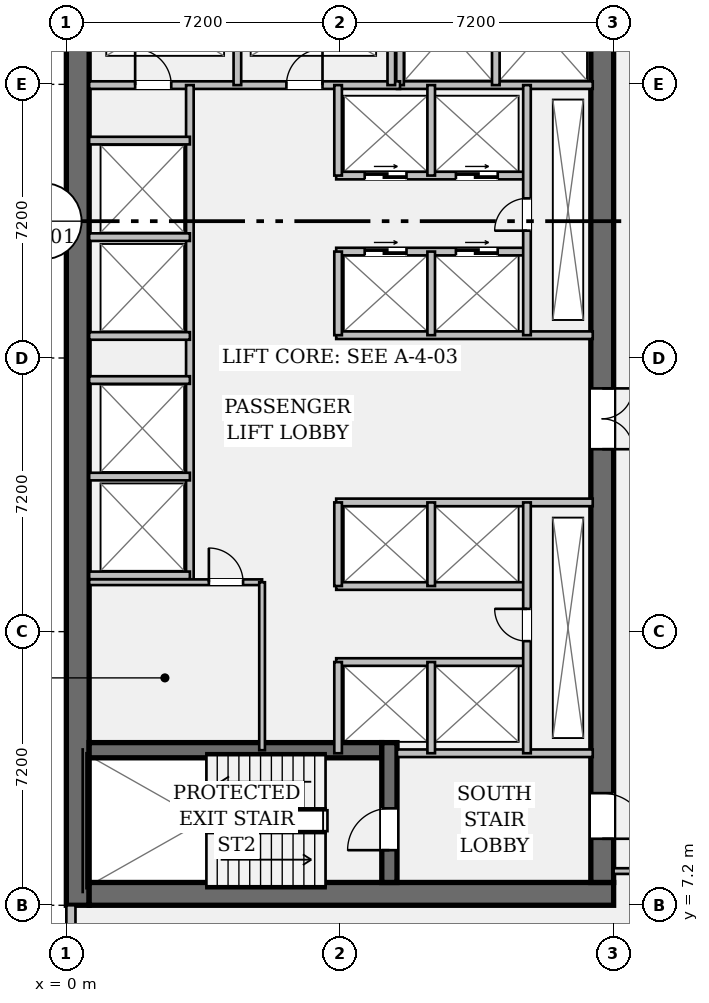
"""IFC4 building model, lengths in metres.
Left out: names, types, materials, properties, quantities, classifications, styles, units other than length and angle.
Written with IfcOpenShell. Run it as: python <this file> out.ifc"""

import sys

from ifc_helpers import new_model, si_unit, direction, frame, frame_2d, origin, place, context, subcontext, project, spatial, rectangle, extrude, element, fill, save


model = new_model("IFC4")
c1 = context("Model", 3, precision=1e-05, world=origin(), true_north=direction((0.0, 1.0)))
c2 = subcontext(c1, "Body", "Model", "MODEL_VIEW")
j1 = project(units=[si_unit("LENGTHUNIT", "METRE"), si_unit("PLANEANGLEUNIT", "RADIAN")], contexts=[c1])
p1 = place(None, origin())
s1 = spatial("IfcSite", under=j1, at=p1, CompositionType="ELEMENT")
p2 = place(p1, origin())
s2 = spatial("IfcBuilding", under=s1, at=p2, CompositionType="ELEMENT")
p3 = place(p2, frame((0.0, 0.0, 17.85)))
s3 = spatial("IfcBuildingStorey", under=s2, at=p3, CompositionType="ELEMENT", Elevation=17.85)
p4 = place(p3, frame((0.3, 7.2, 0.0), z_axis=(0.0, 0.0, 1.0), x_axis=(0.0, 1.0, 0.0)))
e1 = element("IfcWall", 1, at=p4, inside=s3, PredefinedType="SHEAR", context=c2, shape_type="SweptSolid", body=[
    extrude(rectangle(XDim=28.8, YDim=0.6, at=frame_2d((14.4, 0.0))), origin(), (0.0, 0.0, 1.0), 3.91),
])
p5 = place(p3, frame((0.6, 7.5, 0.0), z_axis=(0.0, 0.0, 1.0), x_axis=(1.0, 0.0, 0.0)))
e2 = element("IfcWall", 2, at=p5, inside=s3, PredefinedType="SHEAR", context=c2, shape_type="SweptSolid", body=[
    extrude(rectangle(XDim=13.8, YDim=0.6, at=frame_2d((6.9, 0.0))), origin(), (0.0, 0.0, 1.0), 3.91),
])
p6 = place(p3, frame((14.1, 35.4, 0.0), z_axis=(0.0, 0.0, 1.0), x_axis=(0.0, -1.0, 0.0)))
e3 = element("IfcWall", 3, at=p6, inside=s3, PredefinedType="SHEAR", context=c2, shape_type="SweptSolid", body=[
    extrude(rectangle(XDim=27.6, YDim=0.6, at=frame_2d((13.8, 0.0))), origin(), (0.0, 0.0, 1.0), 3.91),
])
p7 = place(p6, frame((1.3, 0.0, 0.0)))
e4 = element("IfcOpeningElement", 4, at=p7, cuts=e3, PredefinedType="OPENING", context=c2, shape_type="SweptSolid", body=[
    extrude(rectangle(XDim=1.2, YDim=2.15, at=frame_2d((0.6, 1.075))), frame((0.0, 0.312, 0.0), z_axis=(0.0, -1.0, 0.0), x_axis=(1.0, 0.0, 0.0)), (0.0, 0.0, 1.0), 0.624),
])
p8 = place(p6, frame((25.25, 0.0, 0.0)))
e5 = element("IfcOpeningElement", 5, at=p8, cuts=e3, PredefinedType="OPENING", context=c2, shape_type="SweptSolid", body=[
    extrude(rectangle(XDim=1.2, YDim=2.15, at=frame_2d((0.6, 1.075))), frame((0.0, 0.312, 0.0), z_axis=(0.0, -1.0, 0.0), x_axis=(1.0, 0.0, 0.0)), (0.0, 0.0, 1.0), 0.624),
])
p9 = place(p6, frame((14.6, 0.0, 0.0)))
e6 = element("IfcOpeningElement", 6, at=p9, cuts=e3, PredefinedType="OPENING", context=c2, shape_type="SweptSolid", body=[
    extrude(rectangle(XDim=1.6, YDim=2.2, at=frame_2d((0.8, 1.1))), frame((0.0, 0.312, 0.0), z_axis=(0.0, -1.0, 0.0), x_axis=(1.0, 0.0, 0.0)), (0.0, 0.0, 1.0), 0.624),
])
p10 = place(p3, frame((0.6, 11.28, 0.0), z_axis=(0.0, 0.0, 1.0), x_axis=(1.0, 0.0, 0.0)))
e7 = element("IfcWall", 7, at=p10, inside=s3, PredefinedType="SHEAR", context=c2, shape_type="SweptSolid", body=[
    extrude(rectangle(XDim=7.7, YDim=0.4, at=frame_2d((3.85, 0.0))), origin(), (0.0, 0.0, 1.0), 3.91),
])
p11 = place(p3, frame((8.5, 7.8, 0.0), z_axis=(0.0, 0.0, 1.0), x_axis=(0.0, 1.0, 0.0)))
e8 = element("IfcWall", 8, at=p11, inside=s3, PredefinedType="SHEAR", context=c2, shape_type="SweptSolid", body=[
    extrude(rectangle(XDim=3.68, YDim=0.4, at=frame_2d((1.84, 0.0))), origin(), (0.0, 0.0, 1.0), 3.91),
])
p12 = place(p11, frame((0.85, 0.0, 0.0)))
e9 = element("IfcOpeningElement", 9, at=p12, cuts=e8, PredefinedType="OPENING", context=c2, shape_type="SweptSolid", body=[
    extrude(rectangle(XDim=1.1, YDim=2.15, at=frame_2d((0.55, 1.075))), frame((0.0, 0.212, 0.0), z_axis=(0.0, -1.0, 0.0), x_axis=(1.0, 0.0, 0.0)), (0.0, 0.0, 1.0), 0.424),
])
p13 = place(p3, frame((0.12, 2.82, 0.0), z_axis=(0.0, 0.0, 1.0), x_axis=(0.0, 1.0, 0.0)))
e10 = element("IfcWall", 10, at=p13, inside=s3, PredefinedType="STANDARD", context=c2, shape_type="SweptSolid", body=[
    extrude(rectangle(XDim=4.38, YDim=0.24, at=frame_2d((2.19, 0.0))), origin(), (0.0, 0.0, 1.0), 3.91),
])
p14 = place(p13, frame((1.29, 0.0, 0.95)))
e11 = element("IfcOpeningElement", 11, at=p14, cuts=e10, PredefinedType="OPENING", context=c2, shape_type="SweptSolid", body=[
    extrude(rectangle(XDim=1.8, YDim=1.8, at=frame_2d((0.9, 0.9))), frame((0.0, 0.132, 0.0), z_axis=(0.0, -1.0, 0.0), x_axis=(1.0, 0.0, 0.0)), (0.0, 0.0, 1.0), 0.264),
])
for number, where, z_axis, x_axis in (
    (12, (8.7, 11.2, 0.0), (0.0, 0.0, 1.0), (1.0, 0.0, 0.0)),
    (13, (8.7, 28.78, 0.0), (0.0, 0.0, 1.0), (1.0, 0.0, 0.0)),
):
    element("IfcWall", number, at=place(p3, frame(where, z_axis=z_axis, x_axis=x_axis)), inside=s3, PredefinedType="PARTITIONING", context=c2, shape_type="SweptSolid", body=[
        extrude(rectangle(XDim=5.15, YDim=0.2, at=frame_2d((2.575, 0.0))), origin(), (0.0, 0.0, 1.0), 3.91),
    ])
for number, where, z_axis, x_axis in (
    (14, (8.78, 28.78, 0.0), (0.0, 0.0, 1.0), (0.0, 1.0, 0.0)),
    (15, (11.3, 28.78, 0.0), (0.0, 0.0, 1.0), (0.0, 1.0, 0.0)),
):
    element("IfcWall", number, at=place(p3, frame(where, z_axis=z_axis, x_axis=x_axis)), inside=s3, PredefinedType="PARTITIONING", context=c2, shape_type="SweptSolid", body=[
        extrude(rectangle(XDim=3.1, YDim=0.2, at=frame_2d((1.55, 0.0))), origin(), (0.0, 0.0, 1.0), 3.91),
    ])
p15 = place(p3, frame((0.6, 28.78, 0.0), z_axis=(0.0, 0.0, 1.0), x_axis=(1.0, 0.0, 0.0)))
e16 = element("IfcWall", 16, at=p15, inside=s3, PredefinedType="PARTITIONING", context=c2, shape_type="SweptSolid", body=[
    extrude(rectangle(XDim=8.18, YDim=0.2, at=frame_2d((4.09, 0.0))), origin(), (0.0, 0.0, 1.0), 3.91),
])
p16 = place(p15, frame((1.21, 0.0, 0.0)))
e17 = element("IfcOpeningElement", 17, at=p16, cuts=e16, PredefinedType="OPENING", context=c2, shape_type="SweptSolid", body=[
    extrude(rectangle(XDim=0.95, YDim=2.15, at=frame_2d((0.475, 1.075))), frame((0.0, 0.112, 0.0), z_axis=(0.0, -1.0, 0.0), x_axis=(1.0, 0.0, 0.0)), (0.0, 0.0, 1.0), 0.224),
])
p17 = place(p15, frame((5.19, 0.0, 0.0)))
e18 = element("IfcOpeningElement", 18, at=p17, cuts=e16, PredefinedType="OPENING", context=c2, shape_type="SweptSolid", body=[
    extrude(rectangle(XDim=0.95, YDim=2.15, at=frame_2d((0.475, 1.075))), frame((0.0, 0.112, 0.0), z_axis=(0.0, -1.0, 0.0), x_axis=(1.0, 0.0, 0.0)), (0.0, 0.0, 1.0), 0.224),
])
for number, where, z_axis, x_axis in (
    (19, (4.5, 28.78, 0.0), (0.0, 0.0, 1.0), (0.0, 1.0, 0.0)),
    (20, (8.55, 28.78, 0.0), (0.0, 0.0, 1.0), (0.0, 1.0, 0.0)),
):
    element("IfcWall", number, at=place(p3, frame(where, z_axis=z_axis, x_axis=x_axis)), inside=s3, PredefinedType="PARTITIONING", context=c2, shape_type="SweptSolid", body=[
        extrude(rectangle(XDim=2.94, YDim=0.2, at=frame_2d((1.47, 0.0))), origin(), (0.0, 0.0, 1.0), 3.91),
    ])
p18 = place(p3, frame((3.25, 15.7, 0.0), z_axis=(0.0, 0.0, 1.0), x_axis=(0.0, 1.0, 0.0)))
e21 = element("IfcWall", 21, at=p18, inside=s3, PredefinedType="PARTITIONING", context=c2, shape_type="SweptSolid", body=[
    extrude(rectangle(XDim=13.08, YDim=0.2, at=frame_2d((6.54, 0.0))), origin(), (0.0, 0.0, 1.0), 3.91),
])
for number, where, z_axis, x_axis in (
    (22, (0.6, 15.88, 0.0), (0.0, 0.0, 1.0), (1.0, 0.0, 0.0)),
    (23, (0.6, 18.48, 0.0), (0.0, 0.0, 1.0), (1.0, 0.0, 0.0)),
    (24, (0.6, 22.18, 0.0), (0.0, 0.0, 1.0), (1.0, 0.0, 0.0)),
    (25, (0.6, 24.78, 0.0), (0.0, 0.0, 1.0), (1.0, 0.0, 0.0)),
    (26, (0.6, 21.02, 0.0), (0.0, 0.0, 1.0), (1.0, 0.0, 0.0)),
    (27, (0.6, 27.32, 0.0), (0.0, 0.0, 1.0), (1.0, 0.0, 0.0)),
):
    element("IfcWall", number, at=place(p3, frame(where, z_axis=z_axis, x_axis=x_axis)), inside=s3, PredefinedType="PARTITIONING", context=c2, shape_type="SweptSolid", body=[
        extrude(rectangle(XDim=2.65, YDim=0.2, at=frame_2d((1.325, 0.0))), origin(), (0.0, 0.0, 1.0), 3.91),
    ])
p19 = place(p3, frame((7.1, 22.2, 0.0), z_axis=(0.0, 0.0, 1.0), x_axis=(1.0, 0.0, 0.0)))
e28 = element("IfcWall", 28, at=p19, inside=s3, PredefinedType="PARTITIONING", context=c2, shape_type="SweptSolid", body=[
    extrude(rectangle(XDim=6.75, YDim=0.2, at=frame_2d((3.375, 0.0))), origin(), (0.0, 0.0, 1.0), 3.91),
])
p20 = place(p3, frame((7.1, 24.4, 0.0), z_axis=(0.0, 0.0, 1.0), x_axis=(1.0, 0.0, 0.0)))
e29 = element("IfcWall", 29, at=p20, inside=s3, PredefinedType="PARTITIONING", context=c2, shape_type="SweptSolid", body=[
    extrude(rectangle(XDim=5.02, YDim=0.2, at=frame_2d((2.51, 0.0))), origin(), (0.0, 0.0, 1.0), 3.91),
])
p21 = place(p20, frame((0.75, 0.0, 0.0)))
e30 = element("IfcOpeningElement", 30, at=p21, cuts=e29, PredefinedType="OPENING", context=c2, shape_type="SweptSolid", body=[
    extrude(rectangle(XDim=1.1, YDim=2.2, at=frame_2d((0.55, 1.1))), frame((0.0, 0.112, 0.0), z_axis=(0.0, -1.0, 0.0), x_axis=(1.0, 0.0, 0.0)), (0.0, 0.0, 1.0), 0.224),
])
p22 = place(p20, frame((3.15, 0.0, 0.0)))
e31 = element("IfcOpeningElement", 31, at=p22, cuts=e29, PredefinedType="OPENING", context=c2, shape_type="SweptSolid", body=[
    extrude(rectangle(XDim=1.1, YDim=2.2, at=frame_2d((0.55, 1.1))), frame((0.0, 0.112, 0.0), z_axis=(0.0, -1.0, 0.0), x_axis=(1.0, 0.0, 0.0)), (0.0, 0.0, 1.0), 0.224),
])
p23 = place(p3, frame((7.1, 26.4, 0.0), z_axis=(0.0, 0.0, 1.0), x_axis=(1.0, 0.0, 0.0)))
e32 = element("IfcWall", 32, at=p23, inside=s3, PredefinedType="PARTITIONING", context=c2, shape_type="SweptSolid", body=[
    extrude(rectangle(XDim=5.02, YDim=0.2, at=frame_2d((2.51, 0.0))), origin(), (0.0, 0.0, 1.0), 3.91),
])
p24 = place(p23, frame((0.75, 0.0, 0.0)))
e33 = element("IfcOpeningElement", 33, at=p24, cuts=e32, PredefinedType="OPENING", context=c2, shape_type="SweptSolid", body=[
    extrude(rectangle(XDim=1.1, YDim=2.2, at=frame_2d((0.55, 1.1))), frame((0.0, 0.112, 0.0), z_axis=(0.0, -1.0, 0.0), x_axis=(1.0, 0.0, 0.0)), (0.0, 0.0, 1.0), 0.224),
])
p25 = place(p23, frame((3.15, 0.0, 0.0)))
e34 = element("IfcOpeningElement", 34, at=p25, cuts=e32, PredefinedType="OPENING", context=c2, shape_type="SweptSolid", body=[
    extrude(rectangle(XDim=1.1, YDim=2.2, at=frame_2d((0.55, 1.1))), frame((0.0, 0.112, 0.0), z_axis=(0.0, -1.0, 0.0), x_axis=(1.0, 0.0, 0.0)), (0.0, 0.0, 1.0), 0.224),
])
p26 = place(p3, frame((7.15, 22.2, 0.0), z_axis=(0.0, 0.0, 1.0), x_axis=(0.0, 1.0, 0.0)))
e35 = element("IfcWall", 35, at=p26, inside=s3, PredefinedType="PARTITIONING", context=c2, shape_type="SweptSolid", body=[
    extrude(rectangle(XDim=2.2, YDim=0.2, at=frame_2d((1.1, 0.0))), origin(), (0.0, 0.0, 1.0), 3.91),
])
p27 = place(p3, frame((7.15, 26.4, 0.0), z_axis=(0.0, 0.0, 1.0), x_axis=(0.0, 1.0, 0.0)))
e36 = element("IfcWall", 36, at=p27, inside=s3, PredefinedType="PARTITIONING", context=c2, shape_type="SweptSolid", body=[
    extrude(rectangle(XDim=2.38, YDim=0.2, at=frame_2d((1.19, 0.0))), origin(), (0.0, 0.0, 1.0), 3.91),
])
p28 = place(p3, frame((9.6, 22.2, 0.0), z_axis=(0.0, 0.0, 1.0), x_axis=(0.0, 1.0, 0.0)))
e37 = element("IfcWall", 37, at=p28, inside=s3, PredefinedType="PARTITIONING", context=c2, shape_type="SweptSolid", body=[
    extrude(rectangle(XDim=2.2, YDim=0.2, at=frame_2d((1.1, 0.0))), origin(), (0.0, 0.0, 1.0), 3.91),
])
p29 = place(p3, frame((9.6, 26.4, 0.0), z_axis=(0.0, 0.0, 1.0), x_axis=(0.0, 1.0, 0.0)))
e38 = element("IfcWall", 38, at=p29, inside=s3, PredefinedType="PARTITIONING", context=c2, shape_type="SweptSolid", body=[
    extrude(rectangle(XDim=2.38, YDim=0.2, at=frame_2d((1.19, 0.0))), origin(), (0.0, 0.0, 1.0), 3.91),
])
p30 = place(p3, frame((12.12, 22.2, 0.0), z_axis=(0.0, 0.0, 1.0), x_axis=(0.0, 1.0, 0.0)))
e39 = element("IfcWall", 39, at=p30, inside=s3, PredefinedType="PARTITIONING", context=c2, shape_type="SweptSolid", body=[
    extrude(rectangle(XDim=6.58, YDim=0.2, at=frame_2d((3.29, 0.0))), origin(), (0.0, 0.0, 1.0), 3.91),
])
p31 = place(p30, frame((2.75, 0.0, 0.0)))
e40 = element("IfcOpeningElement", 40, at=p31, cuts=e39, PredefinedType="OPENING", context=c2, shape_type="SweptSolid", body=[
    extrude(rectangle(XDim=0.85, YDim=2.15, at=frame_2d((0.425, 1.075))), frame((0.0, 0.112, 0.0), z_axis=(0.0, -1.0, 0.0), x_axis=(1.0, 0.0, 0.0)), (0.0, 0.0, 1.0), 0.224),
])
p32 = place(p3, frame((7.1, 17.8, 0.0), z_axis=(0.0, 0.0, 1.0), x_axis=(1.0, 0.0, 0.0)))
e41 = element("IfcWall", 41, at=p32, inside=s3, PredefinedType="PARTITIONING", context=c2, shape_type="SweptSolid", body=[
    extrude(rectangle(XDim=6.75, YDim=0.2, at=frame_2d((3.375, 0.0))), origin(), (0.0, 0.0, 1.0), 3.91),
])
for number, where, z_axis, x_axis in (
    (42, (7.1, 15.6, 0.0), (0.0, 0.0, 1.0), (1.0, 0.0, 0.0)),
    (43, (7.1, 13.6, 0.0), (0.0, 0.0, 1.0), (1.0, 0.0, 0.0)),
):
    element("IfcWall", number, at=place(p3, frame(where, z_axis=z_axis, x_axis=x_axis)), inside=s3, PredefinedType="PARTITIONING", context=c2, shape_type="SweptSolid", body=[
        extrude(rectangle(XDim=5.02, YDim=0.2, at=frame_2d((2.51, 0.0))), origin(), (0.0, 0.0, 1.0), 3.91),
    ])
p33 = place(p3, frame((7.15, 15.6, 0.0), z_axis=(0.0, 0.0, 1.0), x_axis=(0.0, 1.0, 0.0)))
e44 = element("IfcWall", 44, at=p33, inside=s3, PredefinedType="PARTITIONING", context=c2, shape_type="SweptSolid", body=[
    extrude(rectangle(XDim=2.2, YDim=0.2, at=frame_2d((1.1, 0.0))), origin(), (0.0, 0.0, 1.0), 3.91),
])
p34 = place(p3, frame((7.15, 11.2, 0.0), z_axis=(0.0, 0.0, 1.0), x_axis=(0.0, 1.0, 0.0)))
e45 = element("IfcWall", 45, at=p34, inside=s3, PredefinedType="PARTITIONING", context=c2, shape_type="SweptSolid", body=[
    extrude(rectangle(XDim=2.4, YDim=0.2, at=frame_2d((1.2, 0.0))), origin(), (0.0, 0.0, 1.0), 3.91),
])
p35 = place(p3, frame((9.6, 15.6, 0.0), z_axis=(0.0, 0.0, 1.0), x_axis=(0.0, 1.0, 0.0)))
e46 = element("IfcWall", 46, at=p35, inside=s3, PredefinedType="PARTITIONING", context=c2, shape_type="SweptSolid", body=[
    extrude(rectangle(XDim=2.2, YDim=0.2, at=frame_2d((1.1, 0.0))), origin(), (0.0, 0.0, 1.0), 3.91),
])
p36 = place(p3, frame((9.6, 11.2, 0.0), z_axis=(0.0, 0.0, 1.0), x_axis=(0.0, 1.0, 0.0)))
e47 = element("IfcWall", 47, at=p36, inside=s3, PredefinedType="PARTITIONING", context=c2, shape_type="SweptSolid", body=[
    extrude(rectangle(XDim=2.4, YDim=0.2, at=frame_2d((1.2, 0.0))), origin(), (0.0, 0.0, 1.0), 3.91),
])
p37 = place(p3, frame((12.12, 11.2, 0.0), z_axis=(0.0, 0.0, 1.0), x_axis=(0.0, 1.0, 0.0)))
e48 = element("IfcWall", 48, at=p37, inside=s3, PredefinedType="PARTITIONING", context=c2, shape_type="SweptSolid", body=[
    extrude(rectangle(XDim=6.6, YDim=0.2, at=frame_2d((3.3, 0.0))), origin(), (0.0, 0.0, 1.0), 3.91),
])
p38 = place(p37, frame((2.95, 0.0, 0.0)))
e49 = element("IfcOpeningElement", 49, at=p38, cuts=e48, PredefinedType="OPENING", context=c2, shape_type="SweptSolid", body=[
    extrude(rectangle(XDim=0.85, YDim=2.15, at=frame_2d((0.425, 1.075))), frame((0.0, 0.112, 0.0), z_axis=(0.0, -1.0, 0.0), x_axis=(1.0, 0.0, 0.0)), (0.0, 0.0, 1.0), 0.224),
])
p39 = place(p3, frame((0.6, 15.7, 0.0), z_axis=(0.0, 0.0, 1.0), x_axis=(1.0, 0.0, 0.0)))
e50 = element("IfcWall", 50, at=p39, inside=s3, PredefinedType="PARTITIONING", context=c2, shape_type="SweptSolid", body=[
    extrude(rectangle(XDim=4.55, YDim=0.15, at=frame_2d((2.275, 0.0))), origin(), (0.0, 0.0, 1.0), 3.91),
])
p40 = place(p39, frame((3.15, 0.0, 0.0)))
e51 = element("IfcOpeningElement", 51, at=p40, cuts=e50, PredefinedType="OPENING", context=c2, shape_type="SweptSolid", body=[
    extrude(rectangle(XDim=0.9, YDim=2.15, at=frame_2d((0.45, 1.075))), frame((0.0, 0.087, 0.0), z_axis=(0.0, -1.0, 0.0), x_axis=(1.0, 0.0, 0.0)), (0.0, 0.0, 1.0), 0.174),
])
p41 = place(p3, frame((5.15, 11.28, 0.0), z_axis=(0.0, 0.0, 1.0), x_axis=(0.0, 1.0, 0.0)))
e52 = element("IfcWall", 52, at=p41, inside=s3, PredefinedType="PARTITIONING", context=c2, shape_type="SweptSolid", body=[
    extrude(rectangle(XDim=4.42, YDim=0.15, at=frame_2d((2.21, 0.0))), origin(), (0.0, 0.0, 1.0), 3.91),
])
p42 = place(p3, frame((14.4, 8.1, 0.0), z_axis=(0.0, 0.0, 1.0), x_axis=(1.0, 0.0, 0.0)))
e53 = element("IfcWall", 53, at=p42, inside=s3, PredefinedType="PARTITIONING", context=c2, shape_type="SweptSolid", body=[
    extrude(rectangle(XDim=3.05, YDim=0.15, at=frame_2d((1.525, 0.0))), origin(), (0.0, 0.0, 1.0), 2.968),
])
p43 = place(p42, frame((0.9, 0.0, 0.0)))
e54 = element("IfcOpeningElement", 54, at=p43, cuts=e53, PredefinedType="OPENING", context=c2, shape_type="SweptSolid", body=[
    extrude(rectangle(XDim=1.0, YDim=2.15, at=frame_2d((0.5, 1.075))), frame((0.0, 0.087, 0.0), z_axis=(0.0, -1.0, 0.0), x_axis=(1.0, 0.0, 0.0)), (0.0, 0.0, 1.0), 0.174),
])
p44 = place(p12, origin())
e55 = element("IfcDoor", 55, at=p44, inside=s3, OperationType="SINGLE_SWING_LEFT", PredefinedType="DOOR", context=c2, shape_type="SweptSolid", body=[
    extrude(rectangle(XDim=1.1, YDim=2.15, at=frame_2d((0.55, 1.075))), frame((0.0, 0.025, 0.0), z_axis=(0.0, -1.0, 0.0), x_axis=(1.0, 0.0, 0.0)), (0.0, 0.0, 1.0), 0.05),
])
fill(e9, e55)
p45 = place(p8, origin())
e56 = element("IfcDoor", 56, at=p45, inside=s3, OperationType="SINGLE_SWING_RIGHT", PredefinedType="DOOR", context=c2, shape_type="SweptSolid", body=[
    extrude(rectangle(XDim=1.2, YDim=2.15, at=frame_2d((0.6, 1.075))), frame((0.0, 0.025, 0.0), z_axis=(0.0, -1.0, 0.0), x_axis=(1.0, 0.0, 0.0)), (0.0, 0.0, 1.0), 0.05),
])
fill(e5, e56)
p46 = place(p16, origin())
e57 = element("IfcDoor", 57, at=p46, inside=s3, OperationType="SINGLE_SWING_LEFT", PredefinedType="DOOR", context=c2, shape_type="SweptSolid", body=[
    extrude(rectangle(XDim=0.95, YDim=2.15, at=frame_2d((0.475, 1.075))), frame((0.0, 0.025, 0.0), z_axis=(0.0, -1.0, 0.0), x_axis=(1.0, 0.0, 0.0)), (0.0, 0.0, 1.0), 0.05),
])
fill(e17, e57)
p47 = place(p17, origin())
e58 = element("IfcDoor", 58, at=p47, inside=s3, OperationType="SINGLE_SWING_RIGHT", PredefinedType="DOOR", context=c2, shape_type="SweptSolid", body=[
    extrude(rectangle(XDim=0.95, YDim=2.15, at=frame_2d((0.475, 1.075))), frame((0.0, 0.025, 0.0), z_axis=(0.0, -1.0, 0.0), x_axis=(1.0, 0.0, 0.0)), (0.0, 0.0, 1.0), 0.05),
])
fill(e18, e58)
p48 = place(p9, origin())
e59 = element("IfcDoor", 59, at=p48, inside=s3, OperationType="DOUBLE_DOOR_SINGLE_SWING", PredefinedType="DOOR", context=c2, shape_type="SweptSolid", body=[
    extrude(rectangle(XDim=1.6, YDim=2.2, at=frame_2d((0.8, 1.1))), frame((0.0, 0.025, 0.0), z_axis=(0.0, -1.0, 0.0), x_axis=(1.0, 0.0, 0.0)), (0.0, 0.0, 1.0), 0.05),
])
fill(e6, e59)
p49 = place(p31, origin())
e60 = element("IfcDoor", 60, at=p49, inside=s3, OperationType="SINGLE_SWING_LEFT", PredefinedType="DOOR", context=c2, shape_type="SweptSolid", body=[
    extrude(rectangle(XDim=0.85, YDim=2.15, at=frame_2d((0.425, 1.075))), frame((0.0, 0.025, 0.0), z_axis=(0.0, -1.0, 0.0), x_axis=(1.0, 0.0, 0.0)), (0.0, 0.0, 1.0), 0.05),
])
fill(e40, e60)
p50 = place(p21, origin())
e61 = element("IfcDoor", 61, at=p50, inside=s3, OperationType="DOUBLE_DOOR_SLIDING", PredefinedType="DOOR", context=c2, shape_type="SweptSolid", body=[
    extrude(rectangle(XDim=1.1, YDim=2.2, at=frame_2d((0.55, 1.1))), frame((0.0, 0.025, 0.0), z_axis=(0.0, -1.0, 0.0), x_axis=(1.0, 0.0, 0.0)), (0.0, 0.0, 1.0), 0.05),
])
fill(e30, e61)
p51 = place(p22, origin())
e62 = element("IfcDoor", 62, at=p51, inside=s3, OperationType="DOUBLE_DOOR_SLIDING", PredefinedType="DOOR", context=c2, shape_type="SweptSolid", body=[
    extrude(rectangle(XDim=1.1, YDim=2.2, at=frame_2d((0.55, 1.1))), frame((0.0, 0.025, 0.0), z_axis=(0.0, -1.0, 0.0), x_axis=(1.0, 0.0, 0.0)), (0.0, 0.0, 1.0), 0.05),
])
fill(e31, e62)
p52 = place(p24, origin())
e63 = element("IfcDoor", 63, at=p52, inside=s3, OperationType="DOUBLE_DOOR_SLIDING", PredefinedType="DOOR", context=c2, shape_type="SweptSolid", body=[
    extrude(rectangle(XDim=1.1, YDim=2.2, at=frame_2d((0.55, 1.1))), frame((0.0, 0.025, 0.0), z_axis=(0.0, -1.0, 0.0), x_axis=(1.0, 0.0, 0.0)), (0.0, 0.0, 1.0), 0.05),
])
fill(e33, e63)
p53 = place(p25, origin())
e64 = element("IfcDoor", 64, at=p53, inside=s3, OperationType="DOUBLE_DOOR_SLIDING", PredefinedType="DOOR", context=c2, shape_type="SweptSolid", body=[
    extrude(rectangle(XDim=1.1, YDim=2.2, at=frame_2d((0.55, 1.1))), frame((0.0, 0.025, 0.0), z_axis=(0.0, -1.0, 0.0), x_axis=(1.0, 0.0, 0.0)), (0.0, 0.0, 1.0), 0.05),
])
fill(e34, e64)
p54 = place(p38, origin())
e65 = element("IfcDoor", 65, at=p54, inside=s3, OperationType="SINGLE_SWING_RIGHT", PredefinedType="DOOR", context=c2, shape_type="SweptSolid", body=[
    extrude(rectangle(XDim=0.85, YDim=2.15, at=frame_2d((0.425, 1.075))), frame((0.0, 0.025, 0.0), z_axis=(0.0, -1.0, 0.0), x_axis=(1.0, 0.0, 0.0)), (0.0, 0.0, 1.0), 0.05),
])
fill(e49, e65)
p55 = place(p40, origin())
e66 = element("IfcDoor", 66, at=p55, inside=s3, OperationType="SINGLE_SWING_LEFT", PredefinedType="DOOR", context=c2, shape_type="SweptSolid", body=[
    extrude(rectangle(XDim=0.9, YDim=2.15, at=frame_2d((0.45, 1.075))), frame((0.0, 0.025, 0.0), z_axis=(0.0, -1.0, 0.0), x_axis=(1.0, 0.0, 0.0)), (0.0, 0.0, 1.0), 0.05),
])
fill(e51, e66)
save(model, sys.argv[1])
